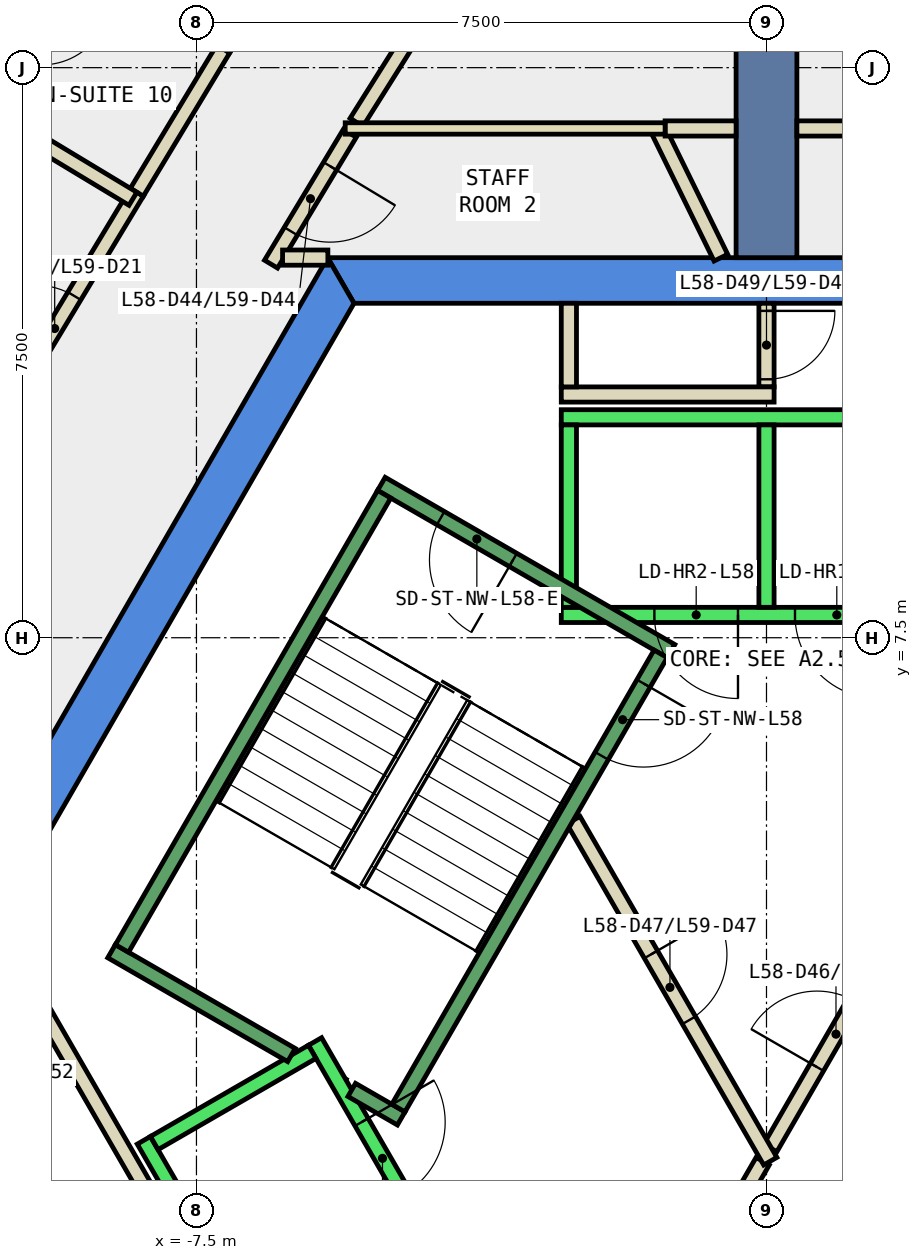
"""IFC4 building model, lengths in metres.
Left out: names, types, materials, properties, quantities, classifications, styles, units other than length and angle.
Written with IfcOpenShell. Run it as: python <this file> out.ifc"""

import sys

from ifc_helpers import new_model, si_unit, direction, frame, frame_2d, origin, place, context, subcontext, project, spatial, polyline, rectangle, outline, extrude, element, fill, save


model = new_model("IFC4")
c1 = context("Model", 3, precision=1e-05, world=origin(), true_north=direction((0.0, 1.0)))
c2 = subcontext(c1, "Body", "Model", "MODEL_VIEW")
j1 = project(units=[si_unit("LENGTHUNIT", "METRE"), si_unit("PLANEANGLEUNIT", "RADIAN")], contexts=[c1])
p1 = place(None, origin())
s1 = spatial("IfcSite", under=j1, at=p1, CompositionType="ELEMENT")
p2 = place(p1, origin())
s2 = spatial("IfcBuilding", under=s1, at=p2, CompositionType="ELEMENT")
p3 = place(p2, frame((0.0, 0.0, 255.8)))
s3 = spatial("IfcBuildingStorey", under=s2, at=p3, CompositionType="ELEMENT", Elevation=255.8)
p4 = place(p3, frame((0.0, 0.0, -0.34)))
e1 = element("IfcWall", 1, at=p4, inside=s3, PredefinedType="SHEAR", context=c2, shape_type="SweptSolid", body=[
    extrude(outline(polyline([(5.774, 12.5), (-5.774, 12.5), (-5.427, 11.9), (5.427, 11.9), (5.774, 12.5)])), origin(), (0.0, 0.0, 1.0), 3.6),
])
p5 = place(p3, frame((0.0, 0.0, -0.34)))
e2 = element("IfcWall", 2, at=p5, inside=s3, PredefinedType="SHEAR", context=c2, shape_type="SweptSolid", body=[
    extrude(outline(polyline([(-10.535, 4.253), (-10.015, 3.953), (-5.427, 11.9), (-5.774, 12.5), (-10.535, 4.253)])), origin(), (0.0, 0.0, 1.0), 3.6),
])
p6 = place(p3, frame((0.0, 0.0, -0.34)))
e3 = element("IfcWall", 3, at=p6, inside=s3, PredefinedType="SHEAR", context=c2, shape_type="SweptSolid", body=[
    extrude(outline(polyline([(-11.547, 2.5), (-5.774, -7.5), (-5.427, -6.9), (-10.854, 2.5), (-11.547, 2.5)])), origin(), (0.0, 0.0, 1.0), 3.6),
])
p7 = place(p3, frame((0.0, 12.5, -0.34), z_axis=(0.0, 0.0, 1.0), x_axis=(0.0, 1.0, 0.0)))
e4 = element("IfcWall", 4, at=p7, inside=s3, PredefinedType="SHEAR", context=c2, shape_type="SweptSolid", body=[
    extrude(rectangle(XDim=9.0, YDim=0.8, at=frame_2d((4.5, 0.0))), origin(), (0.0, 0.0, 1.0), 3.6),
])
p8 = place(p3, frame((-0.6, 12.5, 0.0), z_axis=(0.0, 0.0, 1.0), x_axis=(-0.440531456598, 0.897737175206, 0.0)))
e5 = element("IfcWall", 5, at=p8, inside=s3, PredefinedType="PARTITIONING", context=c2, shape_type="SweptSolid", body=[
    extrude(rectangle(XDim=1.918, YDim=0.2, at=frame_2d((0.959, 0.0))), origin(), (0.0, 0.0, 1.0), 3.26),
])
p9 = place(p3, frame((-5.482, 14.136, 0.0), z_axis=(0.0, 0.0, 1.0), x_axis=(-0.516156559549, -0.856494253357, 0.0)))
e6 = element("IfcWall", 6, at=p9, inside=s3, PredefinedType="PARTITIONING", context=c2, shape_type="SweptSolid", body=[
    extrude(rectangle(XDim=2.009, YDim=0.2, at=frame_2d((1.005, 0.0))), origin(), (0.0, 0.0, 1.0), 3.26),
])
p10 = place(p9, frame((0.504, 0.0, 0.0)))
e7 = element("IfcOpeningElement", 7, at=p10, cuts=e6, PredefinedType="OPENING", context=c2, shape_type="SweptSolid", body=[
    extrude(rectangle(XDim=1.0, YDim=2.1, at=frame_2d((0.5, 1.05))), frame((0.0, 0.11, 0.0), z_axis=(0.0, -1.0, 0.0), x_axis=(1.0, 0.0, 0.0)), (0.0, 0.0, 1.0), 0.22),
])
p11 = place(p3, frame((-6.367, 12.501, 0.0), z_axis=(0.0, 0.0, 1.0), x_axis=(1.0, 0.0, 0.0)))
e8 = element("IfcWall", 8, at=p11, inside=s3, PredefinedType="PARTITIONING", context=c2, shape_type="SweptSolid", body=[
    extrude(rectangle(XDim=0.596, YDim=0.2, at=frame_2d((0.298, 0.0))), origin(), (0.0, 0.0, 1.0), 3.26),
])
p12 = place(p3, frame((0.4, 14.2, 0.0), z_axis=(0.0, 0.0, 1.0), x_axis=(1.0, 0.0, 0.0)))
e9 = element("IfcWall", 9, at=p12, inside=s3, PredefinedType="PARTITIONING", context=c2, shape_type="SweptSolid", body=[
    extrude(rectangle(XDim=5.143, YDim=0.2, at=frame_2d((2.572, 0.0))), origin(), (0.0, 0.0, 1.0), 3.26),
])
p13 = place(p3, frame((-1.334, 14.2, 0.0), z_axis=(0.0, 0.0, 1.0), x_axis=(1.0, 0.0, 0.0)))
e10 = element("IfcWall", 10, at=p13, inside=s3, PredefinedType="PARTITIONING", context=c2, shape_type="SweptSolid", body=[
    extrude(rectangle(XDim=0.934, YDim=0.2, at=frame_2d((0.467, 0.0))), origin(), (0.0, 0.0, 1.0), 3.26),
])
p14 = place(p3, frame((-2.311, 19.181, 0.0), z_axis=(0.0, 0.0, 1.0), x_axis=(-0.532551510955, -0.846397594621, 0.0)))
e11 = element("IfcWall", 11, at=p14, inside=s3, PredefinedType="PARTITIONING", context=c2, shape_type="SweptSolid", body=[
    extrude(rectangle(XDim=5.789, YDim=0.2, at=frame_2d((2.895, 0.0))), origin(), (0.0, 0.0, 1.0), 3.26),
])
p15 = place(p14, frame((2.394, 0.0, 0.0)))
e12 = element("IfcOpeningElement", 12, at=p15, cuts=e11, PredefinedType="OPENING", context=c2, shape_type="SweptSolid", body=[
    extrude(rectangle(XDim=1.0, YDim=2.1, at=frame_2d((0.5, 1.05))), frame((0.0, 0.11, 0.0), z_axis=(0.0, -1.0, 0.0), x_axis=(1.0, 0.0, 0.0)), (0.0, 0.0, 1.0), 0.22),
])
p16 = place(p3, frame((-7.15, 15.246, 0.0), z_axis=(0.0, 0.0, 1.0), x_axis=(0.532449518014, 0.846461759778, 0.0)))
e13 = element("IfcWall", 13, at=p16, inside=s3, PredefinedType="PARTITIONING", context=c2, shape_type="SweptSolid", body=[
    extrude(rectangle(XDim=3.525, YDim=0.2, at=frame_2d((1.763, 0.0))), origin(), (0.0, 0.0, 1.0), 3.26),
])
p17 = place(p16, frame((1.313, 0.0, 0.0)))
e14 = element("IfcOpeningElement", 14, at=p17, cuts=e13, PredefinedType="OPENING", context=c2, shape_type="SweptSolid", body=[
    extrude(rectangle(XDim=1.0, YDim=2.1, at=frame_2d((0.5, 1.05))), frame((0.0, 0.11, 0.0), z_axis=(0.0, -1.0, 0.0), x_axis=(1.0, 0.0, 0.0)), (0.0, 0.0, 1.0), 0.22),
])
p18 = place(p3, frame((-10.498, 9.689, 0.0), z_axis=(0.0, 0.0, 1.0), x_axis=(0.516353342298, 0.856375633643, 0.0)))
e15 = element("IfcWall", 15, at=p18, inside=s3, PredefinedType="PARTITIONING", context=c2, shape_type="SweptSolid", body=[
    extrude(rectangle(XDim=4.288, YDim=0.2, at=frame_2d((2.144, 0.0))), origin(), (0.0, 0.0, 1.0), 3.26),
])
p19 = place(p18, frame((1.694, 0.0, 0.0)))
e16 = element("IfcOpeningElement", 16, at=p19, cuts=e15, PredefinedType="OPENING", context=c2, shape_type="SweptSolid", body=[
    extrude(rectangle(XDim=1.0, YDim=2.1, at=frame_2d((0.5, 1.05))), frame((0.0, 0.11, 0.0), z_axis=(0.0, -1.0, 0.0), x_axis=(1.0, 0.0, 0.0)), (0.0, 0.0, 1.0), 0.22),
])
p20 = place(p3, frame((-8.284, 13.361, 0.0), z_axis=(0.0, 0.0, 1.0), x_axis=(0.516354965559, 0.856374654893, 0.0)))
e17 = element("IfcWall", 17, at=p20, inside=s3, PredefinedType="PARTITIONING", context=c2, shape_type="SweptSolid", body=[
    extrude(rectangle(XDim=2.2, YDim=0.2, at=frame_2d((1.1, 0.0))), origin(), (0.0, 0.0, 1.0), 3.26),
])
p21 = place(p3, frame((0.0, 11.9, 0.0), z_axis=(0.0, 0.0, 1.0), x_axis=(0.0, -1.0, 0.0)))
e18 = element("IfcWall", 18, at=p21, inside=s3, PredefinedType="PARTITIONING", context=c2, shape_type="SweptSolid", body=[
    extrude(rectangle(XDim=1.1, YDim=0.2, at=frame_2d((0.55, 0.0))), origin(), (0.0, 0.0, 1.0), 3.26),
])
p22 = place(p21, frame((0.1, 0.0, 0.0)))
e19 = element("IfcOpeningElement", 19, at=p22, cuts=e18, PredefinedType="OPENING", context=c2, shape_type="SweptSolid", body=[
    extrude(rectangle(XDim=0.9, YDim=2.1, at=frame_2d((0.45, 1.05))), frame((0.0, 0.11, 0.0), z_axis=(0.0, -1.0, 0.0), x_axis=(1.0, 0.0, 0.0)), (0.0, 0.0, 1.0), 0.22),
])
p23 = place(p3, frame((0.1, 10.7, 0.0), z_axis=(0.0, 0.0, 1.0), x_axis=(-1.0, 0.0, 0.0)))
e20 = element("IfcWall", 20, at=p23, inside=s3, PredefinedType="PARTITIONING", context=c2, shape_type="SweptSolid", body=[
    extrude(rectangle(XDim=2.8, YDim=0.2, at=frame_2d((1.4, 0.0))), origin(), (0.0, 0.0, 1.0), 3.26),
])
p24 = place(p3, frame((-2.6, 10.8, 0.0), z_axis=(0.0, 0.0, 1.0), x_axis=(0.0, 1.0, 0.0)))
e21 = element("IfcWall", 21, at=p24, inside=s3, PredefinedType="PARTITIONING", context=c2, shape_type="SweptSolid", body=[
    extrude(rectangle(XDim=1.1, YDim=0.2, at=frame_2d((0.55, 0.0))), origin(), (0.0, 0.0, 1.0), 3.26),
])
p25 = place(p3, frame((-9.751, 2.99, 0.0), z_axis=(0.0, 0.0, 1.0), x_axis=(0.499955951776, -0.866050833545, 0.0)))
e22 = element("IfcWall", 22, at=p25, inside=s3, PredefinedType="PARTITIONING", context=c2, shape_type="SweptSolid", body=[
    extrude(rectangle(XDim=5.4, YDim=0.2, at=frame_2d((2.7, 0.0))), origin(), (0.0, 0.0, 1.0), 3.26),
])
p26 = place(p3, frame((-1.334, 14.2, 0.0), z_axis=(0.0, 0.0, 1.0), x_axis=(-1.0, 0.0, 0.0)))
e23 = element("IfcWall", 23, at=p26, inside=s3, PredefinedType="PARTITIONING", context=c2, shape_type="SweptSolid", body=[
    extrude(rectangle(XDim=4.209, YDim=0.15, at=frame_2d((2.104, 0.0))), origin(), (0.0, 0.0, 1.0), 3.26),
])
p27 = place(p3, frame((-0.982, -1.0, 0.0), z_axis=(0.0, 0.0, 1.0), x_axis=(0.50024047865, 0.865886518847, 0.0)))
e24 = element("IfcWall", 24, at=p27, inside=s3, PredefinedType="PARTITIONING", context=c2, shape_type="SweptSolid", body=[
    extrude(rectangle(XDim=1.863, YDim=0.2, at=frame_2d((0.931, 0.0))), origin(), (0.0, 0.0, 1.0), 3.26),
])
p28 = place(p3, frame((0.05, 0.787, 0.0), z_axis=(0.0, 0.0, 1.0), x_axis=(0.499954076797, 0.866051915934, 0.0)))
e25 = element("IfcWall", 25, at=p28, inside=s3, PredefinedType="PARTITIONING", context=c2, shape_type="SweptSolid", body=[
    extrude(rectangle(XDim=3.558, YDim=0.2, at=frame_2d((1.779, 0.0))), origin(), (0.0, 0.0, 1.0), 3.26),
])
p29 = place(p28, frame((1.229, 0.0, 0.0)))
e26 = element("IfcOpeningElement", 26, at=p29, cuts=e25, PredefinedType="OPENING", context=c2, shape_type="SweptSolid", body=[
    extrude(rectangle(XDim=1.0, YDim=2.1, at=frame_2d((0.5, 1.05))), frame((0.0, 0.11, 0.0), z_axis=(0.0, -1.0, 0.0), x_axis=(1.0, 0.0, 0.0)), (0.0, 0.0, 1.0), 0.22),
])
p30 = place(p3, frame((-2.54, 5.1, 0.0), z_axis=(0.0, 0.0, 1.0), x_axis=(0.499925051871, -0.866068670783, 0.0)))
e27 = element("IfcWall", 27, at=p30, inside=s3, PredefinedType="PARTITIONING", context=c2, shape_type="SweptSolid", body=[
    extrude(rectangle(XDim=5.181, YDim=0.2, at=frame_2d((2.59, 0.0))), origin(), (0.0, 0.0, 1.0), 3.26),
])
p31 = place(p30, frame((2.04, 0.0, 0.0)))
e28 = element("IfcOpeningElement", 28, at=p31, cuts=e27, PredefinedType="OPENING", context=c2, shape_type="SweptSolid", body=[
    extrude(rectangle(XDim=1.0, YDim=2.1, at=frame_2d((0.5, 1.05))), frame((0.0, 0.11, 0.0), z_axis=(0.0, -1.0, 0.0), x_axis=(1.0, 0.0, 0.0)), (0.0, 0.0, 1.0), 0.22),
])
p32 = place(p3, frame((-9.088, 16.674, 0.0), z_axis=(0.0, 0.0, 1.0), x_axis=(-0.516780274192, -0.856118069081, 0.0)))
e29 = element("IfcWall", 29, at=p32, inside=s3, PredefinedType="PARTITIONING", context=c2, shape_type="SweptSolid", body=[
    extrude(rectangle(XDim=2.623, YDim=0.2, at=frame_2d((1.311, 0.0))), origin(), (0.0, 0.0, 1.0), 3.26),
])
p33 = place(p32, frame((0.861, 0.0, 0.0)))
e30 = element("IfcOpeningElement", 30, at=p33, cuts=e29, PredefinedType="OPENING", context=c2, shape_type="SweptSolid", body=[
    extrude(rectangle(XDim=0.9, YDim=2.1, at=frame_2d((0.45, 1.05))), frame((0.0, 0.11, 0.0), z_axis=(0.0, -1.0, 0.0), x_axis=(1.0, 0.0, 0.0)), (0.0, 0.0, 1.0), 0.22),
])
p34 = place(p3, frame((-10.306, 14.463, 0.0), z_axis=(0.0, 0.0, 1.0), x_axis=(0.856338986581, -0.51641411683, 0.0)))
e31 = element("IfcWall", 31, at=p34, inside=s3, PredefinedType="PARTITIONING", context=c2, shape_type="SweptSolid", body=[
    extrude(rectangle(XDim=2.301, YDim=0.2, at=frame_2d((1.15, 0.0))), origin(), (0.0, 0.0, 1.0), 3.26),
])
p35 = place(p3, frame((-9.25, -4.879, 0.0), z_axis=(0.0, 0.0, 1.0), x_axis=(-0.499944124422, 0.866057661161, 0.0)))
e32 = element("IfcWall", 32, at=p35, inside=s3, PredefinedType="PARTITIONING", context=c2, shape_type="SweptSolid", body=[
    extrude(rectangle(XDim=7.405, YDim=0.2, at=frame_2d((3.702, 0.0))), origin(), (0.0, 0.0, 1.0), 3.26),
])
p36 = place(p35, frame((2.533, 0.0, 0.0)))
e33 = element("IfcOpeningElement", 33, at=p36, cuts=e32, PredefinedType="OPENING", context=c2, shape_type="SweptSolid", body=[
    extrude(rectangle(XDim=0.9, YDim=2.1, at=frame_2d((0.45, 1.05))), frame((0.0, 0.11, 0.0), z_axis=(0.0, -1.0, 0.0), x_axis=(1.0, 0.0, 0.0)), (0.0, 0.0, 1.0), 0.22),
])
p37 = place(p3, frame((2.7, 7.8, 0.0), z_axis=(0.0, 0.0, 1.0), x_axis=(-1.0, 0.0, 0.0)))
e34 = element("IfcWall", 34, at=p37, inside=s3, PredefinedType="STANDARD", context=c2, shape_type="SweptSolid", body=[
    extrude(rectangle(XDim=5.4, YDim=0.2, at=frame_2d((2.7, 0.0))), origin(), (0.0, 0.0, 1.0), 3.26),
])
p38 = place(p37, frame((1.225, 0.0, 0.0)))
e35 = element("IfcOpeningElement", 35, at=p38, cuts=e34, PredefinedType="OPENING", context=c2, shape_type="SweptSolid", body=[
    extrude(rectangle(XDim=1.1, YDim=2.1, at=frame_2d((0.55, 1.05))), frame((0.0, 0.11, 0.0), z_axis=(0.0, -1.0, 0.0), x_axis=(1.0, 0.0, 0.0)), (0.0, 0.0, 1.0), 0.22),
])
p39 = place(p37, frame((3.075, 0.0, 0.0)))
e36 = element("IfcOpeningElement", 36, at=p39, cuts=e34, PredefinedType="OPENING", context=c2, shape_type="SweptSolid", body=[
    extrude(rectangle(XDim=1.1, YDim=2.1, at=frame_2d((0.55, 1.05))), frame((0.0, 0.11, 0.0), z_axis=(0.0, -1.0, 0.0), x_axis=(1.0, 0.0, 0.0)), (0.0, 0.0, 1.0), 0.22),
])
p40 = place(p3, frame((2.7, 10.4, 0.0), z_axis=(0.0, 0.0, 1.0), x_axis=(-1.0, 0.0, 0.0)))
e37 = element("IfcWall", 37, at=p40, inside=s3, PredefinedType="STANDARD", context=c2, shape_type="SweptSolid", body=[
    extrude(rectangle(XDim=5.4, YDim=0.2, at=frame_2d((2.7, 0.0))), origin(), (0.0, 0.0, 1.0), 3.26),
])
for number, where, z_axis, x_axis in (
    (38, (0.0, 7.9, 0.0), (0.0, 0.0, 1.0), (0.0, 1.0, 0.0)),
    (39, (-2.6, 7.9, 0.0), (0.0, 0.0, 1.0), (0.0, 1.0, 0.0)),
):
    element("IfcWall", number, at=place(p3, frame(where, z_axis=z_axis, x_axis=x_axis)), inside=s3, PredefinedType="STANDARD", context=c2, shape_type="SweptSolid", body=[
        extrude(rectangle(XDim=2.4, YDim=0.2, at=frame_2d((1.2, 0.0))), origin(), (0.0, 0.0, 1.0), 3.26),
    ])
p41 = place(p3, frame((-5.94, 2.188, 0.0), z_axis=(0.0, 0.0, 1.0), x_axis=(0.500034260056, -0.866005622828, 0.0)))
e40 = element("IfcWall", 40, at=p41, inside=s3, PredefinedType="STANDARD", context=c2, shape_type="SweptSolid", body=[
    extrude(rectangle(XDim=5.399, YDim=0.2, at=frame_2d((2.7, 0.0))), origin(), (0.0, 0.0, 1.0), 3.26),
])
p42 = place(p41, frame((3.075, 0.0, 0.0)))
e41 = element("IfcOpeningElement", 41, at=p42, cuts=e40, PredefinedType="OPENING", context=c2, shape_type="SweptSolid", body=[
    extrude(rectangle(XDim=1.1, YDim=2.1, at=frame_2d((0.55, 1.05))), frame((0.0, 0.11, 0.0), z_axis=(0.0, -1.0, 0.0), x_axis=(1.0, 0.0, 0.0)), (0.0, 0.0, 1.0), 0.22),
])
p43 = place(p41, frame((1.225, 0.0, 0.0)))
e42 = element("IfcOpeningElement", 42, at=p43, cuts=e40, PredefinedType="OPENING", context=c2, shape_type="SweptSolid", body=[
    extrude(rectangle(XDim=1.1, YDim=2.1, at=frame_2d((0.55, 1.05))), frame((0.0, 0.11, 0.0), z_axis=(0.0, -1.0, 0.0), x_axis=(1.0, 0.0, 0.0)), (0.0, 0.0, 1.0), 0.22),
])
p44 = place(p3, frame((-8.192, 0.888, 0.0), z_axis=(0.0, 0.0, 1.0), x_axis=(0.500034260056, -0.866005622828, 0.0)))
e43 = element("IfcWall", 43, at=p44, inside=s3, PredefinedType="STANDARD", context=c2, shape_type="SweptSolid", body=[
    extrude(rectangle(XDim=5.399, YDim=0.2, at=frame_2d((2.7, 0.0))), origin(), (0.0, 0.0, 1.0), 3.26),
])
p45 = place(p3, frame((-5.977, 2.052, 0.0), z_axis=(0.0, 0.0, 1.0), x_axis=(-0.865973769406, -0.500089422704, 0.0)))
e44 = element("IfcWall", 44, at=p45, inside=s3, PredefinedType="STANDARD", context=c2, shape_type="SweptSolid", body=[
    extrude(rectangle(XDim=2.399, YDim=0.2, at=frame_2d((1.2, 0.0))), origin(), (0.0, 0.0, 1.0), 3.26),
])
p46 = place(p3, frame((-1.256, 7.324, 0.0), z_axis=(0.0, 0.0, 1.0), x_axis=(-0.866046073146, 0.499964197906, 0.0)))
e45 = element("IfcWall", 45, at=p46, inside=s3, PredefinedType="STANDARD", context=c2, shape_type="SweptSolid", body=[
    extrude(rectangle(XDim=4.4, YDim=0.2, at=frame_2d((2.2, 0.0))), origin(), (0.0, 0.0, 1.0), 3.26),
])
p47 = place(p46, frame((2.4, 0.0, 0.0)))
e46 = element("IfcOpeningElement", 46, at=p47, cuts=e45, PredefinedType="OPENING", context=c2, shape_type="SweptSolid", body=[
    extrude(rectangle(XDim=1.1, YDim=2.2, at=frame_2d((0.55, 1.1))), frame((0.0, 0.11, 0.0), z_axis=(0.0, -1.0, 0.0), x_axis=(1.0, 0.0, 0.0)), (0.0, 0.0, 1.0), 0.22),
])
p48 = place(p3, frame((-6.25, 2.01, 0.0), z_axis=(0.0, 0.0, 1.0), x_axis=(-0.86611865017, 0.499838457731, 0.0)))
e47 = element("IfcWall", 47, at=p48, inside=s3, PredefinedType="STANDARD", context=c2, shape_type="SweptSolid", body=[
    extrude(rectangle(XDim=2.733, YDim=0.2, at=frame_2d((1.366, 0.0))), origin(), (0.0, 0.0, 1.0), 3.26),
])
p49 = place(p3, frame((-4.806, 1.176, 0.0), z_axis=(0.0, 0.0, 1.0), x_axis=(-0.866558586415, 0.499075361355, 0.0)))
e48 = element("IfcWall", 48, at=p49, inside=s3, PredefinedType="STANDARD", context=c2, shape_type="SweptSolid", body=[
    extrude(rectangle(XDim=0.751, YDim=0.2, at=frame_2d((0.376, 0.0))), origin(), (0.0, 0.0, 1.0), 3.26),
])
p50 = place(p3, frame((-1.393, 7.288, 0.0), z_axis=(0.0, 0.0, 1.0), x_axis=(-0.499963383562, -0.866046543262, 0.0)))
e49 = element("IfcWall", 49, at=p50, inside=s3, PredefinedType="STANDARD", context=c2, shape_type="SweptSolid", body=[
    extrude(rectangle(XDim=6.9, YDim=0.2, at=frame_2d((3.45, 0.0))), origin(), (0.0, 0.0, 1.0), 3.26),
])
p51 = place(p50, frame((0.45, 0.0, 0.0)))
e50 = element("IfcOpeningElement", 50, at=p51, cuts=e49, PredefinedType="OPENING", context=c2, shape_type="SweptSolid", body=[
    extrude(rectangle(XDim=1.1, YDim=2.2, at=frame_2d((0.55, 1.1))), frame((0.0, 0.11, 0.0), z_axis=(0.0, -1.0, 0.0), x_axis=(1.0, 0.0, 0.0)), (0.0, 0.0, 1.0), 0.22),
])
p52 = place(p3, frame((-5.03, 9.388, 0.0), z_axis=(0.0, 0.0, 1.0), x_axis=(-0.499978703459, -0.866037698999, 0.0)))
e51 = element("IfcWall", 51, at=p52, inside=s3, PredefinedType="STANDARD", context=c2, shape_type="SweptSolid", body=[
    extrude(rectangle(XDim=6.9, YDim=0.2, at=frame_2d((3.45, 0.0))), origin(), (0.0, 0.0, 1.0), 3.26),
])
p53 = place(p19, origin())
e52 = element("IfcDoor", 52, at=p53, inside=s3, OperationType="SINGLE_SWING_RIGHT", PredefinedType="DOOR", context=c2, shape_type="SweptSolid", body=[
    extrude(rectangle(XDim=1.0, YDim=2.1, at=frame_2d((0.5, 1.05))), frame((0.0, 0.025, 0.0), z_axis=(0.0, -1.0, 0.0), x_axis=(1.0, 0.0, 0.0)), (0.0, 0.0, 1.0), 0.05),
])
fill(e16, e52)
p54 = place(p10, origin())
e53 = element("IfcDoor", 53, at=p54, inside=s3, OperationType="SINGLE_SWING_LEFT", PredefinedType="DOOR", context=c2, shape_type="SweptSolid", body=[
    extrude(rectangle(XDim=1.0, YDim=2.1, at=frame_2d((0.5, 1.05))), frame((0.0, 0.025, 0.0), z_axis=(0.0, -1.0, 0.0), x_axis=(1.0, 0.0, 0.0)), (0.0, 0.0, 1.0), 0.05),
])
fill(e7, e53)
p55 = place(p29, origin())
e54 = element("IfcDoor", 54, at=p55, inside=s3, OperationType="SINGLE_SWING_RIGHT", PredefinedType="DOOR", context=c2, shape_type="SweptSolid", body=[
    extrude(rectangle(XDim=1.0, YDim=2.1, at=frame_2d((0.5, 1.05))), frame((0.0, 0.025, 0.0), z_axis=(0.0, -1.0, 0.0), x_axis=(1.0, 0.0, 0.0)), (0.0, 0.0, 1.0), 0.05),
])
fill(e26, e54)
p56 = place(p31, origin())
e55 = element("IfcDoor", 55, at=p56, inside=s3, OperationType="SINGLE_SWING_RIGHT", PredefinedType="DOOR", context=c2, shape_type="SweptSolid", body=[
    extrude(rectangle(XDim=1.0, YDim=2.1, at=frame_2d((0.5, 1.05))), frame((0.0, 0.025, 0.0), z_axis=(0.0, -1.0, 0.0), x_axis=(1.0, 0.0, 0.0)), (0.0, 0.0, 1.0), 0.05),
])
fill(e28, e55)
p57 = place(p22, origin())
e56 = element("IfcDoor", 56, at=p57, inside=s3, OperationType="SINGLE_SWING_LEFT", PredefinedType="DOOR", context=c2, shape_type="SweptSolid", body=[
    extrude(rectangle(XDim=0.9, YDim=2.1, at=frame_2d((0.45, 1.05))), frame((0.0, 0.025, 0.0), z_axis=(0.0, -1.0, 0.0), x_axis=(1.0, 0.0, 0.0)), (0.0, 0.0, 1.0), 0.05),
])
fill(e19, e56)
p58 = place(p38, origin())
e57 = element("IfcDoor", 57, at=p58, inside=s3, OperationType="SLIDING_TO_LEFT", PredefinedType="DOOR", context=c2, shape_type="SweptSolid", body=[
    extrude(rectangle(XDim=1.1, YDim=2.1, at=frame_2d((0.55, 1.05))), frame((0.0, 0.025, 0.0), z_axis=(0.0, -1.0, 0.0), x_axis=(1.0, 0.0, 0.0)), (0.0, 0.0, 1.0), 0.05),
])
fill(e35, e57)
p59 = place(p39, origin())
e58 = element("IfcDoor", 58, at=p59, inside=s3, OperationType="SLIDING_TO_LEFT", PredefinedType="DOOR", context=c2, shape_type="SweptSolid", body=[
    extrude(rectangle(XDim=1.1, YDim=2.1, at=frame_2d((0.55, 1.05))), frame((0.0, 0.025, 0.0), z_axis=(0.0, -1.0, 0.0), x_axis=(1.0, 0.0, 0.0)), (0.0, 0.0, 1.0), 0.05),
])
fill(e36, e58)
p60 = place(p43, origin())
e59 = element("IfcDoor", 59, at=p60, inside=s3, OperationType="SLIDING_TO_LEFT", PredefinedType="DOOR", context=c2, shape_type="SweptSolid", body=[
    extrude(rectangle(XDim=1.1, YDim=2.1, at=frame_2d((0.55, 1.05))), frame((0.0, 0.025, 0.0), z_axis=(0.0, -1.0, 0.0), x_axis=(1.0, 0.0, 0.0)), (0.0, 0.0, 1.0), 0.05),
])
fill(e42, e59)
p61 = place(p51, origin())
e60 = element("IfcDoor", 60, at=p61, inside=s3, OperationType="SINGLE_SWING_LEFT", PredefinedType="DOOR", context=c2, shape_type="SweptSolid", body=[
    extrude(rectangle(XDim=1.1, YDim=2.2, at=frame_2d((0.55, 1.1))), frame((0.0, 0.025, 0.0), z_axis=(0.0, -1.0, 0.0), x_axis=(1.0, 0.0, 0.0)), (0.0, 0.0, 1.0), 0.05),
])
fill(e50, e60)
p62 = place(p47, origin())
e61 = element("IfcDoor", 61, at=p62, inside=s3, OperationType="SINGLE_SWING_LEFT", PredefinedType="DOOR", context=c2, shape_type="SweptSolid", body=[
    extrude(rectangle(XDim=1.1, YDim=2.2, at=frame_2d((0.55, 1.1))), frame((0.0, 0.025, 0.0), z_axis=(0.0, -1.0, 0.0), x_axis=(1.0, 0.0, 0.0)), (0.0, 0.0, 1.0), 0.05),
])
fill(e46, e61)
save(model, sys.argv[1])
